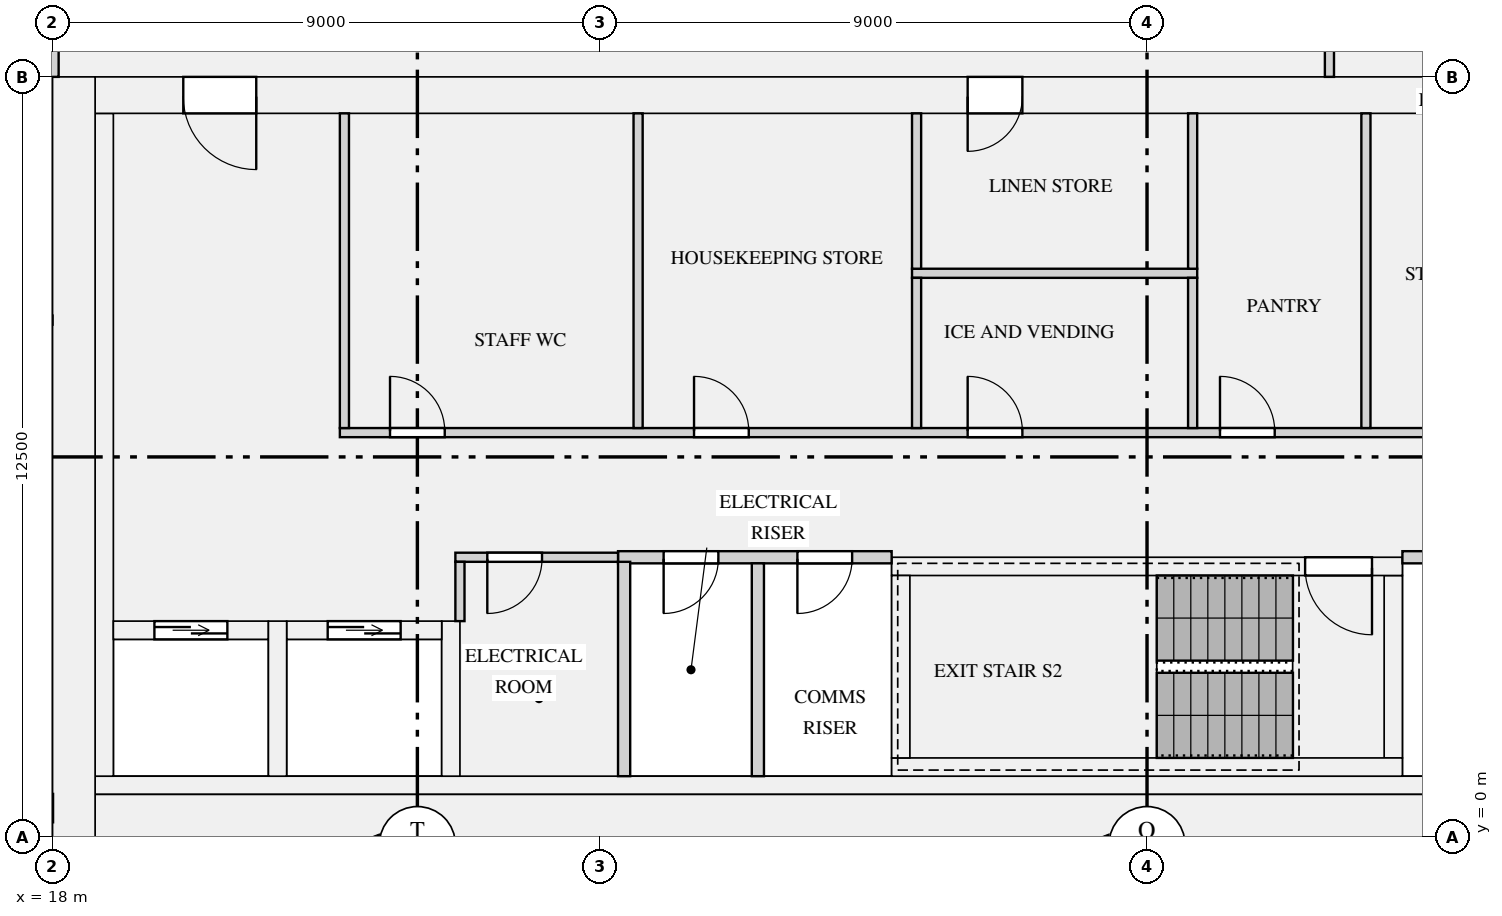
"""IFC4 building model, lengths in metres.
Left out: names, types, materials, properties, quantities, classifications, styles, units other than length and angle.
Written with IfcOpenShell. Run it as: python <this file> out.ifc"""

import sys

from ifc_helpers import new_model, si_unit, direction, frame, frame_2d, origin, place, context, subcontext, project, spatial, rectangle, extrude, element, fill, save


model = new_model("IFC4")
c1 = context("Model", 3, precision=1e-05, world=origin(), true_north=direction((0.0, 1.0)))
c2 = subcontext(c1, "Body", "Model", "MODEL_VIEW")
j1 = project(units=[si_unit("LENGTHUNIT", "METRE"), si_unit("PLANEANGLEUNIT", "RADIAN")], contexts=[c1])
p1 = place(None, origin())
s1 = spatial("IfcSite", under=j1, at=p1, CompositionType="ELEMENT")
p2 = place(p1, origin())
s2 = spatial("IfcBuilding", under=s1, at=p2, CompositionType="ELEMENT")
p3 = place(p2, frame((0.0, 0.0, 141.3)))
s3 = spatial("IfcBuildingStorey", under=s2, at=p3, CompositionType="ELEMENT", Elevation=141.3)
p4 = place(p3, frame((18.35, 0.0, 0.0), z_axis=(0.0, 0.0, 1.0), x_axis=(0.0, 1.0, 0.0)))
e1 = element("IfcWall", 1, at=p4, inside=s3, PredefinedType="SHEAR", context=c2, shape_type="SweptSolid", body=[
    extrude(rectangle(XDim=12.5, YDim=0.7, at=frame_2d((6.25, 0.0))), origin(), (0.0, 0.0, 1.0), 3.15),
])
p5 = place(p3, frame((18.7, 0.35, 0.0), z_axis=(0.0, 0.0, 1.0), x_axis=(1.0, 0.0, 0.0)))
e2 = element("IfcWall", 2, at=p5, inside=s3, PredefinedType="SHEAR", context=c2, shape_type="SweptSolid", body=[
    extrude(rectangle(XDim=34.6, YDim=0.7, at=frame_2d((17.3, 0.0))), origin(), (0.0, 0.0, 1.0), 3.15),
])
p6 = place(p3, frame((18.7, 12.2, 0.0), z_axis=(0.0, 0.0, 1.0), x_axis=(1.0, 0.0, 0.0)))
e3 = element("IfcWall", 3, at=p6, inside=s3, PredefinedType="SHEAR", context=c2, shape_type="SweptSolid", body=[
    extrude(rectangle(XDim=34.6, YDim=0.6, at=frame_2d((17.3, 0.0))), origin(), (0.0, 0.0, 1.0), 3.15),
])
p7 = place(p6, frame((24.475, 0.0, 0.0)))
e4 = element("IfcOpeningElement", 4, at=p7, cuts=e3, PredefinedType="OPENING", context=c2, shape_type="SweptSolid", body=[
    extrude(rectangle(XDim=1.1, YDim=2.1, at=frame_2d((0.55, 1.05))), frame((0.0, 0.31, 0.0), z_axis=(0.0, -1.0, 0.0), x_axis=(1.0, 0.0, 0.0)), (0.0, 0.0, 1.0), 0.62),
])
p8 = place(p6, frame((26.725, 0.0, 0.0)))
e5 = element("IfcOpeningElement", 5, at=p8, cuts=e3, PredefinedType="OPENING", context=c2, shape_type="SweptSolid", body=[
    extrude(rectangle(XDim=1.1, YDim=2.1, at=frame_2d((0.55, 1.05))), frame((0.0, 0.31, 0.0), z_axis=(0.0, -1.0, 0.0), x_axis=(1.0, 0.0, 0.0)), (0.0, 0.0, 1.0), 0.62),
])
p9 = place(p6, frame((28.975, 0.0, 0.0)))
e6 = element("IfcOpeningElement", 6, at=p9, cuts=e3, PredefinedType="OPENING", context=c2, shape_type="SweptSolid", body=[
    extrude(rectangle(XDim=1.1, YDim=2.1, at=frame_2d((0.55, 1.05))), frame((0.0, 0.31, 0.0), z_axis=(0.0, -1.0, 0.0), x_axis=(1.0, 0.0, 0.0)), (0.0, 0.0, 1.0), 0.62),
])
p10 = place(p6, frame((14.35, 0.0, 0.0)))
e7 = element("IfcOpeningElement", 7, at=p10, cuts=e3, PredefinedType="OPENING", context=c2, shape_type="SweptSolid", body=[
    extrude(rectangle(XDim=0.9, YDim=2.1, at=frame_2d((0.45, 1.05))), frame((0.0, 0.31, 0.0), z_axis=(0.0, -1.0, 0.0), x_axis=(1.0, 0.0, 0.0)), (0.0, 0.0, 1.0), 0.62),
])
p11 = place(p6, frame((1.45, 0.0, 0.0)))
e8 = element("IfcOpeningElement", 8, at=p11, cuts=e3, PredefinedType="OPENING", context=c2, shape_type="SweptSolid", body=[
    extrude(rectangle(XDim=1.2, YDim=2.1, at=frame_2d((0.6, 1.05))), frame((0.0, 0.31, 0.0), z_axis=(0.0, -1.0, 0.0), x_axis=(1.0, 0.0, 0.0)), (0.0, 0.0, 1.0), 0.62),
])
p12 = place(p6, frame((31.95, 0.0, 0.0)))
e9 = element("IfcOpeningElement", 9, at=p12, cuts=e3, PredefinedType="OPENING", context=c2, shape_type="SweptSolid", body=[
    extrude(rectangle(XDim=1.2, YDim=2.1, at=frame_2d((0.6, 1.05))), frame((0.0, 0.31, 0.0), z_axis=(0.0, -1.0, 0.0), x_axis=(1.0, 0.0, 0.0)), (0.0, 0.0, 1.0), 0.62),
])
p13 = place(p3, frame((18.85, 1.0, 0.0), z_axis=(0.0, 0.0, 1.0), x_axis=(0.0, 1.0, 0.0)))
e10 = element("IfcWall", 10, at=p13, inside=s3, PredefinedType="SHEAR", context=c2, shape_type="SweptSolid", body=[
    extrude(rectangle(XDim=10.9, YDim=0.3, at=frame_2d((5.45, 0.0))), origin(), (0.0, 0.0, 1.0), 3.15),
])
p14 = place(p3, frame((18.7, 0.85, 0.0), z_axis=(0.0, 0.0, 1.0), x_axis=(1.0, 0.0, 0.0)))
e11 = element("IfcWall", 11, at=p14, inside=s3, PredefinedType="SHEAR", context=c2, shape_type="SweptSolid", body=[
    extrude(rectangle(XDim=34.6, YDim=0.3, at=frame_2d((17.3, 0.0))), origin(), (0.0, 0.0, 1.0), 3.15),
])
p15 = place(p3, frame((19.0, 3.4, 0.0), z_axis=(0.0, 0.0, 1.0), x_axis=(1.0, 0.0, 0.0)))
e12 = element("IfcWall", 12, at=p15, inside=s3, PredefinedType="SHEAR", context=c2, shape_type="SweptSolid", body=[
    extrude(rectangle(XDim=2.55, YDim=0.3, at=frame_2d((1.275, 0.0))), origin(), (0.0, 0.0, 1.0), 3.15),
])
p16 = place(p15, frame((0.675, 0.0, 0.0)))
e13 = element("IfcOpeningElement", 13, at=p16, cuts=e12, PredefinedType="OPENING", context=c2, shape_type="SweptSolid", body=[
    extrude(rectangle(XDim=1.2, YDim=2.1, at=frame_2d((0.6, 1.05))), frame((0.0, 0.16, 0.0), z_axis=(0.0, -1.0, 0.0), x_axis=(1.0, 0.0, 0.0)), (0.0, 0.0, 1.0), 0.32),
])
p17 = place(p3, frame((21.85, 3.4, 0.0), z_axis=(0.0, 0.0, 1.0), x_axis=(1.0, 0.0, 0.0)))
e14 = element("IfcWall", 14, at=p17, inside=s3, PredefinedType="SHEAR", context=c2, shape_type="SweptSolid", body=[
    extrude(rectangle(XDim=2.55, YDim=0.3, at=frame_2d((1.275, 0.0))), origin(), (0.0, 0.0, 1.0), 3.15),
])
p18 = place(p17, frame((0.675, 0.0, 0.0)))
e15 = element("IfcOpeningElement", 15, at=p18, cuts=e14, PredefinedType="OPENING", context=c2, shape_type="SweptSolid", body=[
    extrude(rectangle(XDim=1.2, YDim=2.1, at=frame_2d((0.6, 1.05))), frame((0.0, 0.16, 0.0), z_axis=(0.0, -1.0, 0.0), x_axis=(1.0, 0.0, 0.0)), (0.0, 0.0, 1.0), 0.32),
])
for number, where, z_axis, x_axis in (
    (16, (21.7, 1.0, 0.0), (0.0, 0.0, 1.0), (0.0, 1.0, 0.0)),
    (17, (24.55, 1.0, 0.0), (0.0, 0.0, 1.0), (0.0, 1.0, 0.0)),
):
    element("IfcWall", number, at=place(p3, frame(where, z_axis=z_axis, x_axis=x_axis)), inside=s3, PredefinedType="SHEAR", context=c2, shape_type="SweptSolid", body=[
        extrude(rectangle(XDim=2.55, YDim=0.3, at=frame_2d((1.275, 0.0))), origin(), (0.0, 0.0, 1.0), 3.15),
    ])
p19 = place(p3, frame((31.8, 1.15, 0.0), z_axis=(0.0, 0.0, 1.0), x_axis=(1.0, 0.0, 0.0)))
e18 = element("IfcWall", 18, at=p19, inside=s3, PredefinedType="SHEAR", context=c2, shape_type="SweptSolid", body=[
    extrude(rectangle(XDim=8.4, YDim=0.3, at=frame_2d((4.2, 0.0))), origin(), (0.0, 0.0, 1.0), 3.15),
])
p20 = place(p3, frame((31.8, 4.45, 0.0), z_axis=(0.0, 0.0, 1.0), x_axis=(1.0, 0.0, 0.0)))
e19 = element("IfcWall", 19, at=p20, inside=s3, PredefinedType="SHEAR", context=c2, shape_type="SweptSolid", body=[
    extrude(rectangle(XDim=8.4, YDim=0.3, at=frame_2d((4.2, 0.0))), origin(), (0.0, 0.0, 1.0), 3.15),
])
p21 = place(p20, frame((6.8, 0.0, 0.0)))
e20 = element("IfcOpeningElement", 20, at=p21, cuts=e19, PredefinedType="OPENING", context=c2, shape_type="SweptSolid", body=[
    extrude(rectangle(XDim=1.1, YDim=2.1, at=frame_2d((0.55, 1.05))), frame((0.0, 0.16, 0.0), z_axis=(0.0, -1.0, 0.0), x_axis=(1.0, 0.0, 0.0)), (0.0, 0.0, 1.0), 0.32),
])
for number, where, z_axis, x_axis in (
    (21, (31.95, 1.3, 0.0), (0.0, 0.0, 1.0), (0.0, 1.0, 0.0)),
    (22, (40.05, 1.3, 0.0), (0.0, 0.0, 1.0), (0.0, 1.0, 0.0)),
):
    element("IfcWall", number, at=place(p3, frame(where, z_axis=z_axis, x_axis=x_axis)), inside=s3, PredefinedType="SHEAR", context=c2, shape_type="SweptSolid", body=[
        extrude(rectangle(XDim=3.0, YDim=0.3, at=frame_2d((1.5, 0.0))), origin(), (0.0, 0.0, 1.0), 3.15),
    ])
p22 = place(p3, frame((27.3, 4.6, 0.0), z_axis=(0.0, 0.0, 1.0), x_axis=(1.0, 0.0, 0.0)))
e23 = element("IfcWall", 23, at=p22, inside=s3, PredefinedType="PARTITIONING", context=c2, shape_type="SweptSolid", body=[
    extrude(rectangle(XDim=4.5, YDim=0.2, at=frame_2d((2.25, 0.0))), origin(), (0.0, 0.0, 1.0), 2.83),
])
p23 = place(p22, frame((0.75, 0.0, 0.0)))
e24 = element("IfcOpeningElement", 24, at=p23, cuts=e23, PredefinedType="OPENING", context=c2, shape_type="SweptSolid", body=[
    extrude(rectangle(XDim=0.9, YDim=2.1, at=frame_2d((0.45, 1.05))), frame((0.0, 0.11, 0.0), z_axis=(0.0, -1.0, 0.0), x_axis=(1.0, 0.0, 0.0)), (0.0, 0.0, 1.0), 0.22),
])
p24 = place(p22, frame((2.95, 0.0, 0.0)))
e25 = element("IfcOpeningElement", 25, at=p24, cuts=e23, PredefinedType="OPENING", context=c2, shape_type="SweptSolid", body=[
    extrude(rectangle(XDim=0.9, YDim=2.1, at=frame_2d((0.45, 1.05))), frame((0.0, 0.11, 0.0), z_axis=(0.0, -1.0, 0.0), x_axis=(1.0, 0.0, 0.0)), (0.0, 0.0, 1.0), 0.22),
])
p25 = place(p3, frame((40.2, 4.6, 0.0), z_axis=(0.0, 0.0, 1.0), x_axis=(1.0, 0.0, 0.0)))
e26 = element("IfcWall", 26, at=p25, inside=s3, PredefinedType="PARTITIONING", context=c2, shape_type="SweptSolid", body=[
    extrude(rectangle(XDim=4.5, YDim=0.2, at=frame_2d((2.25, 0.0))), origin(), (0.0, 0.0, 1.0), 2.83),
])
p26 = place(p25, frame((0.65, 0.0, 0.0)))
e27 = element("IfcOpeningElement", 27, at=p26, cuts=e26, PredefinedType="OPENING", context=c2, shape_type="SweptSolid", body=[
    extrude(rectangle(XDim=0.9, YDim=2.1, at=frame_2d((0.45, 1.05))), frame((0.0, 0.11, 0.0), z_axis=(0.0, -1.0, 0.0), x_axis=(1.0, 0.0, 0.0)), (0.0, 0.0, 1.0), 0.22),
])
p27 = place(p25, frame((2.85, 0.0, 0.0)))
e28 = element("IfcOpeningElement", 28, at=p27, cuts=e26, PredefinedType="OPENING", context=c2, shape_type="SweptSolid", body=[
    extrude(rectangle(XDim=0.9, YDim=2.1, at=frame_2d((0.45, 1.05))), frame((0.0, 0.11, 0.0), z_axis=(0.0, -1.0, 0.0), x_axis=(1.0, 0.0, 0.0)), (0.0, 0.0, 1.0), 0.22),
])
p28 = place(p3, frame((24.625, 4.6, 0.0), z_axis=(0.0, 0.0, 1.0), x_axis=(1.0, 0.0, 0.0)))
e29 = element("IfcWall", 29, at=p28, inside=s3, PredefinedType="PARTITIONING", context=c2, shape_type="SweptSolid", body=[
    extrude(rectangle(XDim=2.675, YDim=0.15, at=frame_2d((1.337, 0.0))), origin(), (0.0, 0.0, 1.0), 2.83),
])
p29 = place(p28, frame((0.525, 0.0, 0.0)))
e30 = element("IfcOpeningElement", 30, at=p29, cuts=e29, PredefinedType="OPENING", context=c2, shape_type="SweptSolid", body=[
    extrude(rectangle(XDim=0.9, YDim=2.1, at=frame_2d((0.45, 1.05))), frame((0.0, 0.085, 0.0), z_axis=(0.0, -1.0, 0.0), x_axis=(1.0, 0.0, 0.0)), (0.0, 0.0, 1.0), 0.17),
])
p30 = place(p3, frame((22.725, 6.65, 0.0), z_axis=(0.0, 0.0, 1.0), x_axis=(1.0, 0.0, 0.0)))
e31 = element("IfcWall", 31, at=p30, inside=s3, PredefinedType="PARTITIONING", context=c2, shape_type="SweptSolid", body=[
    extrude(rectangle(XDim=19.8, YDim=0.15, at=frame_2d((9.9, 0.0))), origin(), (0.0, 0.0, 1.0), 2.83),
])
p31 = place(p30, frame((0.825, 0.0, 0.0)))
e32 = element("IfcOpeningElement", 32, at=p31, cuts=e31, PredefinedType="OPENING", context=c2, shape_type="SweptSolid", body=[
    extrude(rectangle(XDim=0.9, YDim=2.1, at=frame_2d((0.45, 1.05))), frame((0.0, 0.085, 0.0), z_axis=(0.0, -1.0, 0.0), x_axis=(1.0, 0.0, 0.0)), (0.0, 0.0, 1.0), 0.17),
])
p32 = place(p30, frame((5.825, 0.0, 0.0)))
e33 = element("IfcOpeningElement", 33, at=p32, cuts=e31, PredefinedType="OPENING", context=c2, shape_type="SweptSolid", body=[
    extrude(rectangle(XDim=0.9, YDim=2.1, at=frame_2d((0.45, 1.05))), frame((0.0, 0.085, 0.0), z_axis=(0.0, -1.0, 0.0), x_axis=(1.0, 0.0, 0.0)), (0.0, 0.0, 1.0), 0.17),
])
p33 = place(p30, frame((10.325, 0.0, 0.0)))
e34 = element("IfcOpeningElement", 34, at=p33, cuts=e31, PredefinedType="OPENING", context=c2, shape_type="SweptSolid", body=[
    extrude(rectangle(XDim=0.9, YDim=2.1, at=frame_2d((0.45, 1.05))), frame((0.0, 0.085, 0.0), z_axis=(0.0, -1.0, 0.0), x_axis=(1.0, 0.0, 0.0)), (0.0, 0.0, 1.0), 0.17),
])
p34 = place(p30, frame((14.475, 0.0, 0.0)))
e35 = element("IfcOpeningElement", 35, at=p34, cuts=e31, PredefinedType="OPENING", context=c2, shape_type="SweptSolid", body=[
    extrude(rectangle(XDim=0.9, YDim=2.1, at=frame_2d((0.45, 1.05))), frame((0.0, 0.085, 0.0), z_axis=(0.0, -1.0, 0.0), x_axis=(1.0, 0.0, 0.0)), (0.0, 0.0, 1.0), 0.17),
])
p35 = place(p30, frame((17.825, 0.0, 0.0)))
e36 = element("IfcOpeningElement", 36, at=p35, cuts=e31, PredefinedType="OPENING", context=c2, shape_type="SweptSolid", body=[
    extrude(rectangle(XDim=0.9, YDim=2.1, at=frame_2d((0.45, 1.05))), frame((0.0, 0.085, 0.0), z_axis=(0.0, -1.0, 0.0), x_axis=(1.0, 0.0, 0.0)), (0.0, 0.0, 1.0), 0.17),
])
p36 = place(p3, frame((32.135, 9.27, 0.0), z_axis=(0.0, 0.0, 1.0), x_axis=(1.0, 0.0, 0.0)))
e37 = element("IfcWall", 37, at=p36, inside=s3, PredefinedType="PARTITIONING", context=c2, shape_type="SweptSolid", body=[
    extrude(rectangle(XDim=4.69, YDim=0.15, at=frame_2d((2.345, 0.0))), origin(), (0.0, 0.0, 1.0), 2.83),
])
p37 = place(p3, frame((27.4, 1.0, 0.0), z_axis=(0.0, 0.0, 1.0), x_axis=(0.0, 1.0, 0.0)))
e38 = element("IfcWall", 38, at=p37, inside=s3, PredefinedType="PARTITIONING", context=c2, shape_type="SweptSolid", body=[
    extrude(rectangle(XDim=3.525, YDim=0.2, at=frame_2d((1.762, 0.0))), origin(), (0.0, 0.0, 1.0), 2.83),
])
p38 = place(p3, frame((29.6, 1.0, 0.0), z_axis=(0.0, 0.0, 1.0), x_axis=(0.0, 1.0, 0.0)))
e39 = element("IfcWall", 39, at=p38, inside=s3, PredefinedType="PARTITIONING", context=c2, shape_type="SweptSolid", body=[
    extrude(rectangle(XDim=3.5, YDim=0.2, at=frame_2d((1.75, 0.0))), origin(), (0.0, 0.0, 1.0), 2.83),
])
p39 = place(p3, frame((24.7, 3.55, 0.0), z_axis=(0.0, 0.0, 1.0), x_axis=(0.0, 1.0, 0.0)))
e40 = element("IfcWall", 40, at=p39, inside=s3, PredefinedType="PARTITIONING", context=c2, shape_type="SweptSolid", body=[
    extrude(rectangle(XDim=0.975, YDim=0.15, at=frame_2d((0.487, 0.0))), origin(), (0.0, 0.0, 1.0), 2.83),
])
for number, where, z_axis, x_axis in (
    (41, (22.8, 6.725, 0.0), (0.0, 0.0, 1.0), (0.0, 1.0, 0.0)),
    (42, (27.63, 6.725, 0.0), (0.0, 0.0, 1.0), (0.0, 1.0, 0.0)),
):
    element("IfcWall", number, at=place(p3, frame(where, z_axis=z_axis, x_axis=x_axis)), inside=s3, PredefinedType="PARTITIONING", context=c2, shape_type="SweptSolid", body=[
        extrude(rectangle(XDim=5.175, YDim=0.15, at=frame_2d((2.587, 0.0))), origin(), (0.0, 0.0, 1.0), 2.83),
    ])
for number, where, z_axis, x_axis in (
    (43, (32.21, 6.725, 0.0), (0.0, 0.0, 1.0), (0.0, 1.0, 0.0)),
    (44, (36.75, 6.725, 0.0), (0.0, 0.0, 1.0), (0.0, 1.0, 0.0)),
):
    element("IfcWall", number, at=place(p3, frame(where, z_axis=z_axis, x_axis=x_axis)), inside=s3, PredefinedType="PARTITIONING", context=c2, shape_type="SweptSolid", body=[
        extrude(rectangle(XDim=2.47, YDim=0.15, at=frame_2d((1.235, 0.0))), origin(), (0.0, 0.0, 1.0), 2.83),
    ])
p40 = place(p3, frame((39.6, 6.725, 0.0), z_axis=(0.0, 0.0, 1.0), x_axis=(0.0, 1.0, 0.0)))
e45 = element("IfcWall", 45, at=p40, inside=s3, PredefinedType="PARTITIONING", context=c2, shape_type="SweptSolid", body=[
    extrude(rectangle(XDim=5.175, YDim=0.15, at=frame_2d((2.587, 0.0))), origin(), (0.0, 0.0, 1.0), 2.83),
])
for number, where, z_axis, x_axis in (
    (46, (32.21, 9.345, 0.0), (0.0, 0.0, 1.0), (0.0, 1.0, 0.0)),
    (47, (36.75, 9.345, 0.0), (0.0, 0.0, 1.0), (0.0, 1.0, 0.0)),
):
    element("IfcWall", number, at=place(p3, frame(where, z_axis=z_axis, x_axis=x_axis)), inside=s3, PredefinedType="PARTITIONING", context=c2, shape_type="SweptSolid", body=[
        extrude(rectangle(XDim=2.555, YDim=0.15, at=frame_2d((1.277, 0.0))), origin(), (0.0, 0.0, 1.0), 2.83),
    ])
p41 = place(p3, frame((18.0, 12.5, 0.0), z_axis=(0.0, 0.0, 1.0), x_axis=(0.0, 1.0, 0.0)))
e48 = element("IfcWall", 48, at=p41, inside=s3, PredefinedType="PARTITIONING", context=c2, shape_type="SweptSolid", body=[
    extrude(rectangle(XDim=3.4, YDim=0.2, at=frame_2d((1.7, 0.0))), origin(), (0.0, 0.0, 1.0), 2.83),
])
p42 = place(p3, frame((39.0, 12.5, 0.0), z_axis=(0.0, 0.0, 1.0), x_axis=(0.0, 1.0, 0.0)))
e49 = element("IfcWall", 49, at=p42, inside=s3, PredefinedType="PARTITIONING", context=c2, shape_type="SweptSolid", body=[
    extrude(rectangle(XDim=1.925, YDim=0.15, at=frame_2d((0.962, 0.0))), origin(), (0.0, 0.0, 1.0), 2.83),
])
p43 = place(p16, origin())
e50 = element("IfcDoor", 50, at=p43, inside=s3, OperationType="DOUBLE_DOOR_SLIDING", PredefinedType="DOOR", context=c2, shape_type="SweptSolid", body=[
    extrude(rectangle(XDim=1.2, YDim=2.1, at=frame_2d((0.6, 1.05))), frame((0.0, 0.025, 0.0), z_axis=(0.0, -1.0, 0.0), x_axis=(1.0, 0.0, 0.0)), (0.0, 0.0, 1.0), 0.05),
])
fill(e13, e50)
p44 = place(p18, origin())
e51 = element("IfcDoor", 51, at=p44, inside=s3, OperationType="DOUBLE_DOOR_SLIDING", PredefinedType="DOOR", context=c2, shape_type="SweptSolid", body=[
    extrude(rectangle(XDim=1.2, YDim=2.1, at=frame_2d((0.6, 1.05))), frame((0.0, 0.025, 0.0), z_axis=(0.0, -1.0, 0.0), x_axis=(1.0, 0.0, 0.0)), (0.0, 0.0, 1.0), 0.05),
])
fill(e15, e51)
p45 = place(p21, frame((1.1, 0.0, 0.0), z_axis=(0.0, 0.0, 1.0), x_axis=(-1.0, 0.0, 0.0)))
e52 = element("IfcDoor", 52, at=p45, inside=s3, OperationType="SINGLE_SWING_LEFT", PredefinedType="DOOR", context=c2, shape_type="SweptSolid", body=[
    extrude(rectangle(XDim=1.1, YDim=2.1, at=frame_2d((0.55, 1.05))), frame((0.0, 0.025, 0.0), z_axis=(0.0, -1.0, 0.0), x_axis=(1.0, 0.0, 0.0)), (0.0, 0.0, 1.0), 0.05),
])
fill(e20, e52)
p46 = place(p29, frame((0.9, 0.0, 0.0), z_axis=(0.0, 0.0, 1.0), x_axis=(-1.0, 0.0, 0.0)))
e53 = element("IfcDoor", 53, at=p46, inside=s3, OperationType="SINGLE_SWING_RIGHT", PredefinedType="DOOR", context=c2, shape_type="SweptSolid", body=[
    extrude(rectangle(XDim=0.9, YDim=2.1, at=frame_2d((0.45, 1.05))), frame((0.0, 0.025, 0.0), z_axis=(0.0, -1.0, 0.0), x_axis=(1.0, 0.0, 0.0)), (0.0, 0.0, 1.0), 0.05),
])
fill(e30, e53)
p47 = place(p31, origin())
e54 = element("IfcDoor", 54, at=p47, inside=s3, OperationType="SINGLE_SWING_LEFT", PredefinedType="DOOR", context=c2, shape_type="SweptSolid", body=[
    extrude(rectangle(XDim=0.9, YDim=2.1, at=frame_2d((0.45, 1.05))), frame((0.0, 0.025, 0.0), z_axis=(0.0, -1.0, 0.0), x_axis=(1.0, 0.0, 0.0)), (0.0, 0.0, 1.0), 0.05),
])
fill(e32, e54)
p48 = place(p32, origin())
e55 = element("IfcDoor", 55, at=p48, inside=s3, OperationType="SINGLE_SWING_LEFT", PredefinedType="DOOR", context=c2, shape_type="SweptSolid", body=[
    extrude(rectangle(XDim=0.9, YDim=2.1, at=frame_2d((0.45, 1.05))), frame((0.0, 0.025, 0.0), z_axis=(0.0, -1.0, 0.0), x_axis=(1.0, 0.0, 0.0)), (0.0, 0.0, 1.0), 0.05),
])
fill(e33, e55)
p49 = place(p33, origin())
e56 = element("IfcDoor", 56, at=p49, inside=s3, OperationType="SINGLE_SWING_LEFT", PredefinedType="DOOR", context=c2, shape_type="SweptSolid", body=[
    extrude(rectangle(XDim=0.9, YDim=2.1, at=frame_2d((0.45, 1.05))), frame((0.0, 0.025, 0.0), z_axis=(0.0, -1.0, 0.0), x_axis=(1.0, 0.0, 0.0)), (0.0, 0.0, 1.0), 0.05),
])
fill(e34, e56)
p50 = place(p10, frame((0.9, 0.0, 0.0), z_axis=(0.0, 0.0, 1.0), x_axis=(-1.0, 0.0, 0.0)))
e57 = element("IfcDoor", 57, at=p50, inside=s3, OperationType="SINGLE_SWING_RIGHT", PredefinedType="DOOR", context=c2, shape_type="SweptSolid", body=[
    extrude(rectangle(XDim=0.9, YDim=2.1, at=frame_2d((0.45, 1.05))), frame((0.0, 0.025, 0.0), z_axis=(0.0, -1.0, 0.0), x_axis=(1.0, 0.0, 0.0)), (0.0, 0.0, 1.0), 0.05),
])
fill(e7, e57)
p51 = place(p34, origin())
e58 = element("IfcDoor", 58, at=p51, inside=s3, OperationType="SINGLE_SWING_LEFT", PredefinedType="DOOR", context=c2, shape_type="SweptSolid", body=[
    extrude(rectangle(XDim=0.9, YDim=2.1, at=frame_2d((0.45, 1.05))), frame((0.0, 0.025, 0.0), z_axis=(0.0, -1.0, 0.0), x_axis=(1.0, 0.0, 0.0)), (0.0, 0.0, 1.0), 0.05),
])
fill(e35, e58)
p52 = place(p23, frame((0.9, 0.0, 0.0), z_axis=(0.0, 0.0, 1.0), x_axis=(-1.0, 0.0, 0.0)))
e59 = element("IfcDoor", 59, at=p52, inside=s3, OperationType="SINGLE_SWING_RIGHT", PredefinedType="DOOR", context=c2, shape_type="SweptSolid", body=[
    extrude(rectangle(XDim=0.9, YDim=2.1, at=frame_2d((0.45, 1.05))), frame((0.0, 0.025, 0.0), z_axis=(0.0, -1.0, 0.0), x_axis=(1.0, 0.0, 0.0)), (0.0, 0.0, 1.0), 0.05),
])
fill(e24, e59)
p53 = place(p24, frame((0.9, 0.0, 0.0), z_axis=(0.0, 0.0, 1.0), x_axis=(-1.0, 0.0, 0.0)))
e60 = element("IfcDoor", 60, at=p53, inside=s3, OperationType="SINGLE_SWING_RIGHT", PredefinedType="DOOR", context=c2, shape_type="SweptSolid", body=[
    extrude(rectangle(XDim=0.9, YDim=2.1, at=frame_2d((0.45, 1.05))), frame((0.0, 0.025, 0.0), z_axis=(0.0, -1.0, 0.0), x_axis=(1.0, 0.0, 0.0)), (0.0, 0.0, 1.0), 0.05),
])
fill(e25, e60)
p54 = place(p11, frame((1.2, 0.0, 0.0), z_axis=(0.0, 0.0, 1.0), x_axis=(-1.0, 0.0, 0.0)))
e61 = element("IfcDoor", 61, at=p54, inside=s3, OperationType="SINGLE_SWING_LEFT", PredefinedType="DOOR", context=c2, shape_type="SweptSolid", body=[
    extrude(rectangle(XDim=1.2, YDim=2.1, at=frame_2d((0.6, 1.05))), frame((0.0, 0.025, 0.0), z_axis=(0.0, -1.0, 0.0), x_axis=(1.0, 0.0, 0.0)), (0.0, 0.0, 1.0), 0.05),
])
fill(e8, e61)
save(model, sys.argv[1])
